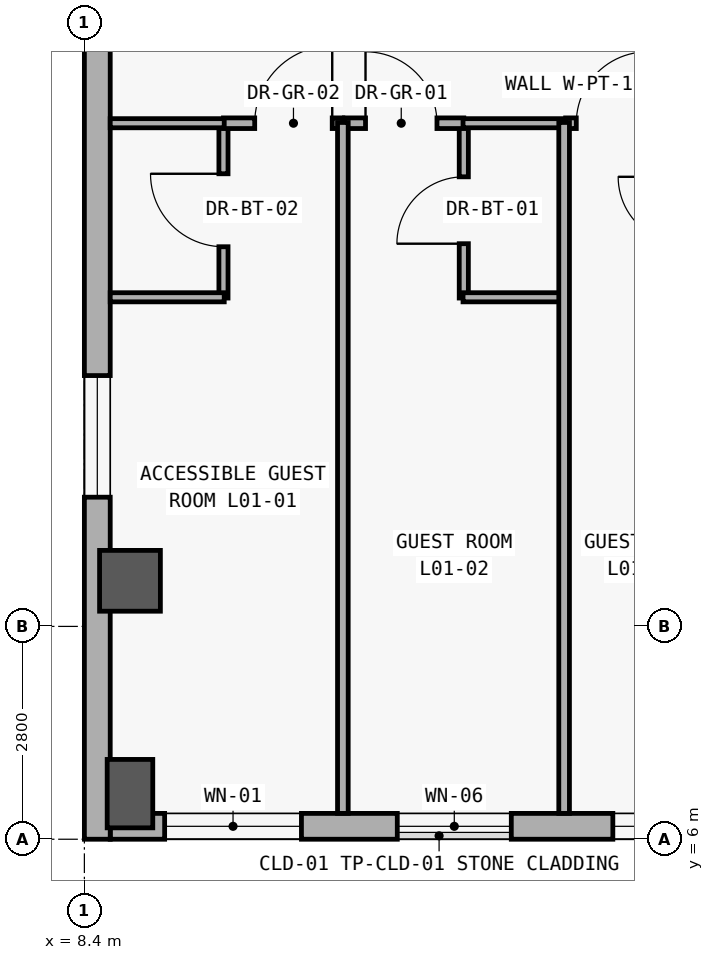
"""IFC4 building model, lengths in metres.
Left out: names, types, materials, properties, quantities, classifications, styles, units other than length and angle.
Written with IfcOpenShell. Run it as: python <this file> out.ifc"""

import sys

from ifc_helpers import new_model, si_unit, direction, frame, frame_2d, origin, origin_2d, place, context, subcontext, project, spatial, rectangle, extrude, element, fill, save


model = new_model("IFC4")
c1 = context("Model", 3, precision=1e-05, world=origin(), true_north=direction((0.0, 1.0)))
c2 = subcontext(c1, "Body", "Model", "MODEL_VIEW")
j1 = project(units=[si_unit("LENGTHUNIT", "METRE"), si_unit("PLANEANGLEUNIT", "RADIAN")], contexts=[c1])
p1 = place(None, origin())
s1 = spatial("IfcSite", under=j1, at=p1, CompositionType="ELEMENT")
p2 = place(p1, origin())
s2 = spatial("IfcBuilding", under=s1, at=p2, CompositionType="ELEMENT")
p3 = place(p2, frame((0.0, 0.0, 5.4)))
s3 = spatial("IfcBuildingStorey", under=s2, at=p3, CompositionType="ELEMENT", Elevation=5.4)
p4 = place(p3, frame((9.0, 6.6, 0.0), z_axis=(0.0, 0.0, 1.0), x_axis=(0.0, 1.0, 0.0)))
e1 = element("IfcColumn", 1, at=p4, inside=s3, PredefinedType="COLUMN", context=c2, shape_type="SweptSolid", body=[
    extrude(rectangle(XDim=0.6, YDim=0.9, at=origin_2d()), origin(), (0.0, 0.0, 1.0), 5.4),
])
p5 = place(p3, frame((9.0, 9.4, 0.0), z_axis=(0.0, 0.0, 1.0), x_axis=(1.0, 0.0, 0.0)))
e2 = element("IfcColumn", 2, at=p5, inside=s3, PredefinedType="COLUMN", context=c2, shape_type="SweptSolid", body=[
    extrude(rectangle(XDim=0.8, YDim=0.8, at=origin_2d()), origin(), (0.0, 0.0, 1.0), 5.4),
])
p6 = place(p3, frame((92.06, 6.17, 0.0), z_axis=(0.0, 0.0, 1.0), x_axis=(-1.0, 0.0, 0.0)))
e3 = element("IfcWall", 3, at=p6, inside=s3, PredefinedType="SOLIDWALL", context=c2, shape_type="SweptSolid", body=[
    extrude(rectangle(XDim=83.32, YDim=0.34, at=frame_2d((41.66, 0.0))), origin(), (0.0, 0.0, 1.0), 5.1),
])
p7 = place(p6, frame((80.804, 0.0, 0.85)))
e4 = element("IfcOpeningElement", 4, at=p7, cuts=e3, PredefinedType="OPENING", context=c2, shape_type="SweptSolid", body=[
    extrude(rectangle(XDim=1.8, YDim=1.8, at=frame_2d((0.9, 0.9))), frame((0.0, 0.18, 0.0), z_axis=(0.0, -1.0, 0.0), x_axis=(1.0, 0.0, 0.0)), (0.0, 0.0, 1.0), 0.36),
])
p8 = place(p6, frame((78.043, 0.0, 0.85)))
e5 = element("IfcOpeningElement", 5, at=p8, cuts=e3, PredefinedType="OPENING", context=c2, shape_type="SweptSolid", body=[
    extrude(rectangle(XDim=1.5, YDim=1.75, at=frame_2d((0.75, 0.875))), frame((0.0, 0.18, 0.0), z_axis=(0.0, -1.0, 0.0), x_axis=(1.0, 0.0, 0.0)), (0.0, 0.0, 1.0), 0.36),
])
p9 = place(p6, frame((75.057, 0.0, 0.85)))
e6 = element("IfcOpeningElement", 6, at=p9, cuts=e3, PredefinedType="OPENING", context=c2, shape_type="SweptSolid", body=[
    extrude(rectangle(XDim=1.65, YDim=1.75, at=frame_2d((0.825, 0.875))), frame((0.0, 0.18, 0.0), z_axis=(0.0, -1.0, 0.0), x_axis=(1.0, 0.0, 0.0)), (0.0, 0.0, 1.0), 0.36),
])
p10 = place(p6, frame((71.997, 0.0, 0.85)))
e7 = element("IfcOpeningElement", 7, at=p10, cuts=e3, PredefinedType="OPENING", context=c2, shape_type="SweptSolid", body=[
    extrude(rectangle(XDim=1.95, YDim=1.75, at=frame_2d((0.975, 0.875))), frame((0.0, 0.18, 0.0), z_axis=(0.0, -1.0, 0.0), x_axis=(1.0, 0.0, 0.0)), (0.0, 0.0, 1.0), 0.36),
])
p11 = place(p6, frame((69.36, 0.0, 0.85)))
e8 = element("IfcOpeningElement", 8, at=p11, cuts=e3, PredefinedType="OPENING", context=c2, shape_type="SweptSolid", body=[
    extrude(rectangle(XDim=1.4, YDim=1.6, at=frame_2d((0.7, 0.8))), frame((0.0, 0.18, 0.0), z_axis=(0.0, -1.0, 0.0), x_axis=(1.0, 0.0, 0.0)), (0.0, 0.0, 1.0), 0.36),
])
p12 = place(p6, frame((66.349, 0.0, 0.85)))
e9 = element("IfcOpeningElement", 9, at=p12, cuts=e3, PredefinedType="OPENING", context=c2, shape_type="SweptSolid", body=[
    extrude(rectangle(XDim=1.6, YDim=1.6, at=frame_2d((0.8, 0.8))), frame((0.0, 0.18, 0.0), z_axis=(0.0, -1.0, 0.0), x_axis=(1.0, 0.0, 0.0)), (0.0, 0.0, 1.0), 0.36),
])
p13 = place(p6, frame((63.338, 0.0, 0.85)))
e10 = element("IfcOpeningElement", 10, at=p13, cuts=e3, PredefinedType="OPENING", context=c2, shape_type="SweptSolid", body=[
    extrude(rectangle(XDim=1.8, YDim=1.6, at=frame_2d((0.9, 0.8))), frame((0.0, 0.18, 0.0), z_axis=(0.0, -1.0, 0.0), x_axis=(1.0, 0.0, 0.0)), (0.0, 0.0, 1.0), 0.36),
])
p14 = place(p6, frame((60.327, 0.0, 0.85)))
e11 = element("IfcOpeningElement", 11, at=p14, cuts=e3, PredefinedType="OPENING", context=c2, shape_type="SweptSolid", body=[
    extrude(rectangle(XDim=2.0, YDim=1.65, at=frame_2d((1.0, 0.825))), frame((0.0, 0.18, 0.0), z_axis=(0.0, -1.0, 0.0), x_axis=(1.0, 0.0, 0.0)), (0.0, 0.0, 1.0), 0.36),
])
p15 = place(p6, frame((57.791, 0.0, 0.85)))
e12 = element("IfcOpeningElement", 12, at=p15, cuts=e3, PredefinedType="OPENING", context=c2, shape_type="SweptSolid", body=[
    extrude(rectangle(XDim=1.25, YDim=1.45, at=frame_2d((0.625, 0.725))), frame((0.0, 0.18, 0.0), z_axis=(0.0, -1.0, 0.0), x_axis=(1.0, 0.0, 0.0)), (0.0, 0.0, 1.0), 0.36),
])
p16 = place(p6, frame((38.744, 0.0, 0.85)))
e13 = element("IfcOpeningElement", 13, at=p16, cuts=e3, PredefinedType="OPENING", context=c2, shape_type="SweptSolid", body=[
    extrude(rectangle(XDim=3.3, YDim=2.15, at=frame_2d((1.65, 1.075))), frame((0.0, 0.18, 0.0), z_axis=(0.0, -1.0, 0.0), x_axis=(1.0, 0.0, 0.0)), (0.0, 0.0, 1.0), 0.36),
])
p17 = place(p6, frame((35.07, 0.0, 0.85)))
e14 = element("IfcOpeningElement", 14, at=p17, cuts=e3, PredefinedType="OPENING", context=c2, shape_type="SweptSolid", body=[
    extrude(rectangle(XDim=1.18, YDim=1.5, at=frame_2d((0.59, 0.75))), frame((0.0, 0.18, 0.0), z_axis=(0.0, -1.0, 0.0), x_axis=(1.0, 0.0, 0.0)), (0.0, 0.0, 1.0), 0.36),
])
p18 = place(p6, frame((30.287, 0.0, 0.85)))
e15 = element("IfcOpeningElement", 15, at=p18, cuts=e3, PredefinedType="OPENING", context=c2, shape_type="SweptSolid", body=[
    extrude(rectangle(XDim=1.28, YDim=1.6, at=frame_2d((0.64, 0.8))), frame((0.0, 0.18, 0.0), z_axis=(0.0, -1.0, 0.0), x_axis=(1.0, 0.0, 0.0)), (0.0, 0.0, 1.0), 0.36),
])
p19 = place(p6, frame((25.503, 0.0, 0.85)))
e16 = element("IfcOpeningElement", 16, at=p19, cuts=e3, PredefinedType="OPENING", context=c2, shape_type="SweptSolid", body=[
    extrude(rectangle(XDim=1.38, YDim=1.7, at=frame_2d((0.69, 0.85))), frame((0.0, 0.18, 0.0), z_axis=(0.0, -1.0, 0.0), x_axis=(1.0, 0.0, 0.0)), (0.0, 0.0, 1.0), 0.36),
])
p20 = place(p6, frame((20.72, 0.0, 0.85)))
e17 = element("IfcOpeningElement", 17, at=p20, cuts=e3, PredefinedType="OPENING", context=c2, shape_type="SweptSolid", body=[
    extrude(rectangle(XDim=1.48, YDim=1.8, at=frame_2d((0.74, 0.9))), frame((0.0, 0.18, 0.0), z_axis=(0.0, -1.0, 0.0), x_axis=(1.0, 0.0, 0.0)), (0.0, 0.0, 1.0), 0.36),
])
p21 = place(p6, frame((15.937, 0.0, 0.85)))
e18 = element("IfcOpeningElement", 18, at=p21, cuts=e3, PredefinedType="OPENING", context=c2, shape_type="SweptSolid", body=[
    extrude(rectangle(XDim=1.58, YDim=1.85, at=frame_2d((0.79, 0.925))), frame((0.0, 0.18, 0.0), z_axis=(0.0, -1.0, 0.0), x_axis=(1.0, 0.0, 0.0)), (0.0, 0.0, 1.0), 0.36),
])
p22 = place(p6, frame((11.154, 0.0, 0.85)))
e19 = element("IfcOpeningElement", 19, at=p22, cuts=e3, PredefinedType="OPENING", context=c2, shape_type="SweptSolid", body=[
    extrude(rectangle(XDim=1.68, YDim=1.9, at=frame_2d((0.84, 0.95))), frame((0.0, 0.18, 0.0), z_axis=(0.0, -1.0, 0.0), x_axis=(1.0, 0.0, 0.0)), (0.0, 0.0, 1.0), 0.36),
])
p23 = place(p6, frame((6.37, 0.0, 0.85)))
e20 = element("IfcOpeningElement", 20, at=p23, cuts=e3, PredefinedType="OPENING", context=c2, shape_type="SweptSolid", body=[
    extrude(rectangle(XDim=1.78, YDim=1.95, at=frame_2d((0.89, 0.975))), frame((0.0, 0.18, 0.0), z_axis=(0.0, -1.0, 0.0), x_axis=(1.0, 0.0, 0.0)), (0.0, 0.0, 1.0), 0.36),
])
p24 = place(p6, frame((1.586, 0.0, 0.85)))
e21 = element("IfcOpeningElement", 21, at=p24, cuts=e3, PredefinedType="OPENING", context=c2, shape_type="SweptSolid", body=[
    extrude(rectangle(XDim=1.88, YDim=1.95, at=frame_2d((0.94, 0.975))), frame((0.0, 0.18, 0.0), z_axis=(0.0, -1.0, 0.0), x_axis=(1.0, 0.0, 0.0)), (0.0, 0.0, 1.0), 0.36),
])
p25 = place(p3, frame((8.57, 6.0, 0.0), z_axis=(0.0, 0.0, 1.0), x_axis=(0.0, 1.0, 0.0)))
e22 = element("IfcWall", 22, at=p25, inside=s3, PredefinedType="SOLIDWALL", context=c2, shape_type="SweptSolid", body=[
    extrude(rectangle(XDim=28.0, YDim=0.34, at=frame_2d((14.0, 0.0))), origin(), (0.0, 0.0, 1.0), 5.1),
])
p26 = place(p25, frame((4.5, 0.0, 0.95)))
e23 = element("IfcOpeningElement", 23, at=p26, cuts=e22, PredefinedType="OPENING", context=c2, shape_type="SweptSolid", body=[
    extrude(rectangle(XDim=1.6, YDim=1.6, at=frame_2d((0.8, 0.8))), frame((0.0, 0.18, 0.0), z_axis=(0.0, -1.0, 0.0), x_axis=(1.0, 0.0, 0.0)), (0.0, 0.0, 1.0), 0.36),
])
p27 = place(p3, frame((10.23, 13.12, 0.0), z_axis=(0.0, 0.0, 1.0), x_axis=(0.0, 1.0, 0.0)))
e24 = element("IfcWall", 24, at=p27, inside=s3, PredefinedType="PARTITIONING", context=c2, shape_type="SweptSolid", body=[
    extrude(rectangle(XDim=2.31, YDim=0.12, at=frame_2d((1.155, 0.0))), origin(), (0.0, 0.0, 1.0), 4.18),
])
p28 = place(p27, frame((0.675, 0.0, 0.0)))
e25 = element("IfcOpeningElement", 25, at=p28, cuts=e24, PredefinedType="OPENING", context=c2, shape_type="SweptSolid", body=[
    extrude(rectangle(XDim=0.96, YDim=2.15, at=frame_2d((0.48, 1.075))), frame((0.0, 0.07, 0.0), z_axis=(0.0, -1.0, 0.0), x_axis=(1.0, 0.0, 0.0)), (0.0, 0.0, 1.0), 0.14),
])
p29 = place(p3, frame((13.392, 13.12, 0.0), z_axis=(0.0, 0.0, 1.0), x_axis=(0.0, 1.0, 0.0)))
e26 = element("IfcWall", 26, at=p29, inside=s3, PredefinedType="PARTITIONING", context=c2, shape_type="SweptSolid", body=[
    extrude(rectangle(XDim=2.31, YDim=0.12, at=frame_2d((1.155, 0.0))), origin(), (0.0, 0.0, 1.0), 4.18),
])
p30 = place(p29, frame((0.715, 0.0, 0.0)))
e27 = element("IfcOpeningElement", 27, at=p30, cuts=e26, PredefinedType="OPENING", context=c2, shape_type="SweptSolid", body=[
    extrude(rectangle(XDim=0.88, YDim=2.15, at=frame_2d((0.44, 1.075))), frame((0.0, 0.07, 0.0), z_axis=(0.0, -1.0, 0.0), x_axis=(1.0, 0.0, 0.0)), (0.0, 0.0, 1.0), 0.14),
])
p31 = place(p3, frame((10.23, 15.42, 0.0), z_axis=(0.0, 0.0, 1.0), x_axis=(1.0, 0.0, 0.0)))
e28 = element("IfcWall", 28, at=p31, inside=s3, PredefinedType="PARTITIONING", context=c2, shape_type="SweptSolid", body=[
    extrude(rectangle(XDim=1.571, YDim=0.14, at=frame_2d((0.786, 0.0))), origin(), (0.0, 0.0, 1.0), 4.18),
])
p32 = place(p31, frame((0.411, 0.0, 0.0)))
e29 = element("IfcOpeningElement", 29, at=p32, cuts=e28, PredefinedType="OPENING", context=c2, shape_type="SweptSolid", body=[
    extrude(rectangle(XDim=1.02, YDim=2.2, at=frame_2d((0.51, 1.1))), frame((0.0, 0.08, 0.0), z_axis=(0.0, -1.0, 0.0), x_axis=(1.0, 0.0, 0.0)), (0.0, 0.0, 1.0), 0.16),
])
p33 = place(p3, frame((11.821, 15.42, 0.0), z_axis=(0.0, 0.0, 1.0), x_axis=(1.0, 0.0, 0.0)))
e30 = element("IfcWall", 30, at=p33, inside=s3, PredefinedType="PARTITIONING", context=c2, shape_type="SweptSolid", body=[
    extrude(rectangle(XDim=1.571, YDim=0.14, at=frame_2d((0.786, 0.0))), origin(), (0.0, 0.0, 1.0), 4.18),
])
p34 = place(p33, frame((0.278, 0.0, 0.0)))
e31 = element("IfcOpeningElement", 31, at=p34, cuts=e30, PredefinedType="OPENING", context=c2, shape_type="SweptSolid", body=[
    extrude(rectangle(XDim=0.94, YDim=2.2, at=frame_2d((0.47, 1.1))), frame((0.0, 0.08, 0.0), z_axis=(0.0, -1.0, 0.0), x_axis=(1.0, 0.0, 0.0)), (0.0, 0.0, 1.0), 0.16),
])
p35 = place(p3, frame((14.732, 15.42, 0.0), z_axis=(0.0, 0.0, 1.0), x_axis=(1.0, 0.0, 0.0)))
e32 = element("IfcWall", 32, at=p35, inside=s3, PredefinedType="PARTITIONING", context=c2, shape_type="SweptSolid", body=[
    extrude(rectangle(XDim=1.571, YDim=0.14, at=frame_2d((0.786, 0.0))), origin(), (0.0, 0.0, 1.0), 4.18),
])
p36 = place(p35, frame((0.14, 0.0, 0.0)))
e33 = element("IfcOpeningElement", 33, at=p36, cuts=e32, PredefinedType="OPENING", context=c2, shape_type="SweptSolid", body=[
    extrude(rectangle(XDim=0.94, YDim=2.2, at=frame_2d((0.47, 1.1))), frame((0.0, 0.08, 0.0), z_axis=(0.0, -1.0, 0.0), x_axis=(1.0, 0.0, 0.0)), (0.0, 0.0, 1.0), 0.16),
])
for number, where, z_axis, x_axis in (
    (34, (8.74, 13.13, 0.0), (0.0, 0.0, 1.0), (1.0, 0.0, 0.0)),
    (35, (8.74, 15.42, 0.0), (0.0, 0.0, 1.0), (1.0, 0.0, 0.0)),
):
    element("IfcWall", number, at=place(p3, frame(where, z_axis=z_axis, x_axis=x_axis)), inside=s3, PredefinedType="PARTITIONING", context=c2, shape_type="SweptSolid", body=[
        extrude(rectangle(XDim=1.5, YDim=0.12, at=frame_2d((0.75, 0.0))), origin(), (0.0, 0.0, 1.0), 4.18),
    ])
for number, where, z_axis, x_axis in (
    (36, (13.382, 13.13, 0.0), (0.0, 0.0, 1.0), (1.0, 0.0, 0.0)),
    (37, (13.382, 15.42, 0.0), (0.0, 0.0, 1.0), (1.0, 0.0, 0.0)),
):
    element("IfcWall", number, at=place(p3, frame(where, z_axis=z_axis, x_axis=x_axis)), inside=s3, PredefinedType="PARTITIONING", context=c2, shape_type="SweptSolid", body=[
        extrude(rectangle(XDim=1.34, YDim=0.12, at=frame_2d((0.67, 0.0))), origin(), (0.0, 0.0, 1.0), 4.18),
    ])
for number, where, z_axis, x_axis in (
    (38, (11.801, 6.34, 0.0), (0.0, 0.0, 1.0), (0.0, 1.0, 0.0)),
    (39, (14.712, 6.34, 0.0), (0.0, 0.0, 1.0), (0.0, 1.0, 0.0)),
):
    element("IfcWall", number, at=place(p3, frame(where, z_axis=z_axis, x_axis=x_axis)), inside=s3, PredefinedType="PARTITIONING", context=c2, shape_type="SweptSolid", body=[
        extrude(rectangle(XDim=9.09, YDim=0.14, at=frame_2d((4.545, 0.0))), origin(), (0.0, 0.0, 1.0), 4.18),
    ])
p37 = place(p7, origin())
e40 = element("IfcWindow", 40, at=p37, inside=s3, PartitioningType="SINGLE_PANEL", PredefinedType="WINDOW", context=c2, shape_type="SweptSolid", body=[
    extrude(rectangle(XDim=1.8, YDim=1.8, at=frame_2d((0.9, 0.9))), frame((0.0, 0.03, 0.0), z_axis=(0.0, -1.0, 0.0), x_axis=(1.0, 0.0, 0.0)), (0.0, 0.0, 1.0), 0.06),
])
fill(e4, e40)
p38 = place(p8, origin())
e41 = element("IfcWindow", 41, at=p38, inside=s3, PartitioningType="SINGLE_PANEL", PredefinedType="WINDOW", context=c2, shape_type="SweptSolid", body=[
    extrude(rectangle(XDim=1.5, YDim=1.75, at=frame_2d((0.75, 0.875))), frame((0.0, 0.03, 0.0), z_axis=(0.0, -1.0, 0.0), x_axis=(1.0, 0.0, 0.0)), (0.0, 0.0, 1.0), 0.06),
])
fill(e5, e41)
p39 = place(p9, origin())
e42 = element("IfcWindow", 42, at=p39, inside=s3, PartitioningType="SINGLE_PANEL", PredefinedType="WINDOW", context=c2, shape_type="SweptSolid", body=[
    extrude(rectangle(XDim=1.65, YDim=1.75, at=frame_2d((0.825, 0.875))), frame((0.0, 0.03, 0.0), z_axis=(0.0, -1.0, 0.0), x_axis=(1.0, 0.0, 0.0)), (0.0, 0.0, 1.0), 0.06),
])
fill(e6, e42)
p40 = place(p26, origin())
e43 = element("IfcWindow", 43, at=p40, inside=s3, PartitioningType="SINGLE_PANEL", PredefinedType="WINDOW", context=c2, shape_type="SweptSolid", body=[
    extrude(rectangle(XDim=1.6, YDim=1.6, at=frame_2d((0.8, 0.8))), frame((0.0, 0.03, 0.0), z_axis=(0.0, -1.0, 0.0), x_axis=(1.0, 0.0, 0.0)), (0.0, 0.0, 1.0), 0.06),
])
fill(e23, e43)
p41 = place(p28, origin())
e44 = element("IfcDoor", 44, at=p41, inside=s3, OperationType="SINGLE_SWING_RIGHT", PredefinedType="DOOR", context=c2, shape_type="SweptSolid", body=[
    extrude(rectangle(XDim=0.96, YDim=2.15, at=frame_2d((0.48, 1.075))), frame((0.0, 0.025, 0.0), z_axis=(0.0, -1.0, 0.0), x_axis=(1.0, 0.0, 0.0)), (0.0, 0.0, 1.0), 0.05),
])
fill(e25, e44)
p42 = place(p30, origin())
e45 = element("IfcDoor", 45, at=p42, inside=s3, OperationType="SINGLE_SWING_LEFT", PredefinedType="DOOR", context=c2, shape_type="SweptSolid", body=[
    extrude(rectangle(XDim=0.88, YDim=2.15, at=frame_2d((0.44, 1.075))), frame((0.0, 0.025, 0.0), z_axis=(0.0, -1.0, 0.0), x_axis=(1.0, 0.0, 0.0)), (0.0, 0.0, 1.0), 0.05),
])
fill(e27, e45)
p43 = place(p32, origin())
e46 = element("IfcDoor", 46, at=p43, inside=s3, OperationType="SINGLE_SWING_RIGHT", PredefinedType="DOOR", context=c2, shape_type="SweptSolid", body=[
    extrude(rectangle(XDim=1.02, YDim=2.2, at=frame_2d((0.51, 1.1))), frame((0.0, 0.025, 0.0), z_axis=(0.0, -1.0, 0.0), x_axis=(1.0, 0.0, 0.0)), (0.0, 0.0, 1.0), 0.05),
])
fill(e29, e46)
p44 = place(p34, origin())
e47 = element("IfcDoor", 47, at=p44, inside=s3, OperationType="SINGLE_SWING_LEFT", PredefinedType="DOOR", context=c2, shape_type="SweptSolid", body=[
    extrude(rectangle(XDim=0.94, YDim=2.2, at=frame_2d((0.47, 1.1))), frame((0.0, 0.025, 0.0), z_axis=(0.0, -1.0, 0.0), x_axis=(1.0, 0.0, 0.0)), (0.0, 0.0, 1.0), 0.05),
])
fill(e31, e47)
p45 = place(p36, origin())
e48 = element("IfcDoor", 48, at=p45, inside=s3, OperationType="SINGLE_SWING_RIGHT", PredefinedType="DOOR", context=c2, shape_type="SweptSolid", body=[
    extrude(rectangle(XDim=0.94, YDim=2.2, at=frame_2d((0.47, 1.1))), frame((0.0, 0.025, 0.0), z_axis=(0.0, -1.0, 0.0), x_axis=(1.0, 0.0, 0.0)), (0.0, 0.0, 1.0), 0.05),
])
fill(e33, e48)
save(model, sys.argv[1])
